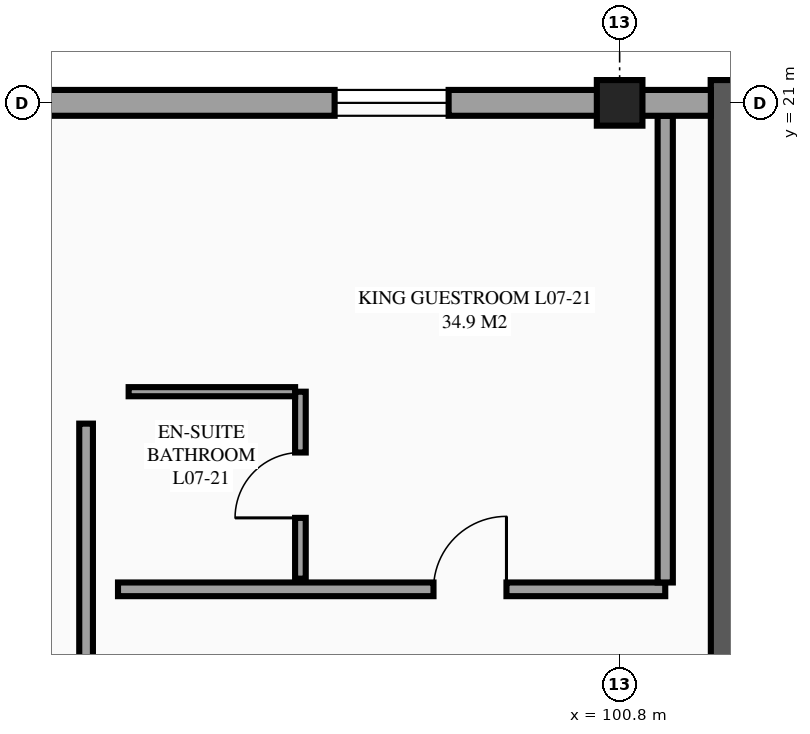
"""IFC4 building model, lengths in metres.
Left out: names, types, materials, properties, quantities, classifications, styles, units other than length and angle.
Written with IfcOpenShell. Run it as: python <this file> out.ifc"""

import sys

from ifc_helpers import new_model, si_unit, direction, frame, frame_2d, origin, origin_2d, place, context, subcontext, project, spatial, rectangle, extrude, element, fill, save


model = new_model("IFC4")
c1 = context("Model", 3, precision=1e-05, world=origin(), true_north=direction((0.0, 1.0)))
c2 = subcontext(c1, "Body", "Model", "MODEL_VIEW")
j1 = project(units=[si_unit("LENGTHUNIT", "METRE"), si_unit("PLANEANGLEUNIT", "RADIAN")], contexts=[c1])
p1 = place(None, origin())
s1 = spatial("IfcSite", under=j1, at=p1, CompositionType="ELEMENT")
p2 = place(p1, origin())
s2 = spatial("IfcBuilding", under=s1, at=p2, CompositionType="ELEMENT")
p3 = place(p2, frame((0.0, 0.0, 29.1)))
s3 = spatial("IfcBuildingStorey", under=s2, at=p3, CompositionType="ELEMENT", Elevation=29.1)
p4 = place(p3, frame((100.8, 21.0, 0.0), z_axis=(0.0, 0.0, 1.0), x_axis=(1.0, 0.0, 0.0)))
e1 = element("IfcColumn", 1, at=p4, inside=s3, PredefinedType="COLUMN", context=c2, shape_type="SweptSolid", body=[
    extrude(rectangle(XDim=0.6, YDim=0.6, at=origin_2d()), origin(), (0.0, 0.0, 1.0), 3.6),
])
p5 = place(p3, frame((100.8, 21.0, 0.0), z_axis=(0.0, 0.0, 1.0), x_axis=(-1.0, 0.0, 0.0)))
e2 = element("IfcWall", 2, at=p5, inside=s3, PredefinedType="STANDARD", context=c2, shape_type="SweptSolid", body=[
    extrude(rectangle(XDim=16.8, YDim=0.34, at=frame_2d((8.4, 0.0))), origin(), (0.0, 0.0, 1.0), 2.48),
])
p6 = place(p5, frame((2.25, 0.0, 0.85)))
e3 = element("IfcOpeningElement", 3, at=p6, cuts=e2, PredefinedType="OPENING", context=c2, shape_type="SweptSolid", body=[
    extrude(rectangle(XDim=1.5, YDim=1.5, at=frame_2d((0.75, 0.75))), frame((0.0, 0.18, 0.0), z_axis=(0.0, -1.0, 0.0), x_axis=(1.0, 0.0, 0.0)), (0.0, 0.0, 1.0), 0.36),
])
p7 = place(p3, frame((107.2, 21.15, 0.0), z_axis=(0.0, 0.0, 1.0), x_axis=(-1.0, 0.0, 0.0)))
e4 = element("IfcWall", 4, at=p7, inside=s3, PredefinedType="SHEAR", context=c2, shape_type="SweptSolid", body=[
    extrude(rectangle(XDim=5.2, YDim=0.3, at=frame_2d((2.6, 0.0))), origin(), (0.0, 0.0, 1.0), 3.6),
])
p8 = place(p3, frame((102.15, 21.3, 0.0), z_axis=(0.0, 0.0, 1.0), x_axis=(0.0, -1.0, 0.0)))
e5 = element("IfcWall", 5, at=p8, inside=s3, PredefinedType="SHEAR", context=c2, shape_type="SweptSolid", body=[
    extrude(rectangle(XDim=8.84, YDim=0.3, at=frame_2d((4.42, 0.0))), origin(), (0.0, 0.0, 1.0), 3.6),
])
p9 = place(p3, frame((94.2, 14.6, 0.0), z_axis=(0.0, 0.0, 1.0), x_axis=(1.0, 0.0, 0.0)))
e6 = element("IfcWall", 6, at=p9, inside=s3, PredefinedType="PARTITIONING", context=c2, shape_type="SweptSolid", body=[
    extrude(rectangle(XDim=7.2, YDim=0.18, at=frame_2d((3.6, 0.0))), origin(), (0.0, 0.0, 1.0), 3.375),
])
p10 = place(p9, frame((4.151, 0.0, 0.0)))
e7 = element("IfcOpeningElement", 7, at=p10, cuts=e6, PredefinedType="OPENING", context=c2, shape_type="SweptSolid", body=[
    extrude(rectangle(XDim=0.96, YDim=2.15, at=frame_2d((0.48, 1.075))), frame((0.0, 0.1, 0.0), z_axis=(0.0, -1.0, 0.0), x_axis=(1.0, 0.0, 0.0)), (0.0, 0.0, 1.0), 0.2),
])
p11 = place(p3, frame((101.4, 14.69, 0.0), z_axis=(0.0, 0.0, 1.0), x_axis=(0.0, 1.0, 0.0)))
e8 = element("IfcWall", 8, at=p11, inside=s3, PredefinedType="PARTITIONING", context=c2, shape_type="SweptSolid", body=[
    extrude(rectangle(XDim=6.14, YDim=0.2, at=frame_2d((3.07, 0.0))), origin(), (0.0, 0.0, 1.0), 3.375),
])
p12 = place(p3, frame((96.6, 14.74, 0.0), z_axis=(0.0, 0.0, 1.0), x_axis=(0.0, 1.0, 0.0)))
e9 = element("IfcWall", 9, at=p12, inside=s3, PredefinedType="PARTITIONING", context=c2, shape_type="SweptSolid", body=[
    extrude(rectangle(XDim=2.46, YDim=0.14, at=frame_2d((1.23, 0.0))), origin(), (0.0, 0.0, 1.0), 3.375),
])
p13 = place(p12, frame((0.8, 0.0, 0.0)))
e10 = element("IfcOpeningElement", 10, at=p13, cuts=e9, PredefinedType="OPENING", context=c2, shape_type="SweptSolid", body=[
    extrude(rectangle(XDim=0.86, YDim=2.1, at=frame_2d((0.43, 1.05))), frame((0.0, 0.08, 0.0), z_axis=(0.0, -1.0, 0.0), x_axis=(1.0, 0.0, 0.0)), (0.0, 0.0, 1.0), 0.16),
])
p14 = place(p3, frame((94.34, 17.2, 0.0), z_axis=(0.0, 0.0, 1.0), x_axis=(1.0, 0.0, 0.0)))
e11 = element("IfcWall", 11, at=p14, inside=s3, PredefinedType="PARTITIONING", context=c2, shape_type="SweptSolid", body=[
    extrude(rectangle(XDim=2.19, YDim=0.12, at=frame_2d((1.095, 0.0))), origin(), (0.0, 0.0, 1.0), 3.375),
])
p15 = place(p3, frame((93.78, 12.91, 0.0), z_axis=(0.0, 0.0, 1.0), x_axis=(0.0, 1.0, 0.0)))
e12 = element("IfcWall", 12, at=p15, inside=s3, PredefinedType="PARTITIONING", context=c2, shape_type="SweptSolid", body=[
    extrude(rectangle(XDim=3.87, YDim=0.18, at=frame_2d((1.935, 0.0))), origin(), (0.0, 0.0, 1.0), 3.375),
])
p16 = place(p3, frame((102.0, 21.0, 0.0), z_axis=(0.0, 0.0, 1.0), x_axis=(-1.0, 0.0, 0.0)))
e13 = element("IfcWall", 13, at=p16, inside=s3, PredefinedType="STANDARD", context=c2, shape_type="SweptSolid", body=[
    extrude(rectangle(XDim=1.2, YDim=0.34, at=frame_2d((0.6, 0.0))), origin(), (0.0, 0.0, 1.0), 3.126),
])
p17 = place(p6, origin())
e14 = element("IfcWindow", 14, at=p17, inside=s3, PartitioningType="SINGLE_PANEL", PredefinedType="WINDOW", context=c2, shape_type="SweptSolid", body=[
    extrude(rectangle(XDim=1.5, YDim=1.5, at=frame_2d((0.75, 0.75))), frame((0.0, 0.03, 0.0), z_axis=(0.0, -1.0, 0.0), x_axis=(1.0, 0.0, 0.0)), (0.0, 0.0, 1.0), 0.06),
])
fill(e3, e14)
p18 = place(p10, origin())
e15 = element("IfcDoor", 15, at=p18, inside=s3, OperationType="SINGLE_SWING_RIGHT", PredefinedType="DOOR", context=c2, shape_type="SweptSolid", body=[
    extrude(rectangle(XDim=0.96, YDim=2.15, at=frame_2d((0.48, 1.075))), frame((0.0, 0.025, 0.0), z_axis=(0.0, -1.0, 0.0), x_axis=(1.0, 0.0, 0.0)), (0.0, 0.0, 1.0), 0.05),
])
fill(e7, e15)
p19 = place(p13, origin())
e16 = element("IfcDoor", 16, at=p19, inside=s3, OperationType="SINGLE_SWING_LEFT", PredefinedType="DOOR", context=c2, shape_type="SweptSolid", body=[
    extrude(rectangle(XDim=0.86, YDim=2.1, at=frame_2d((0.43, 1.05))), frame((0.0, 0.025, 0.0), z_axis=(0.0, -1.0, 0.0), x_axis=(1.0, 0.0, 0.0)), (0.0, 0.0, 1.0), 0.05),
])
fill(e10, e16)
save(model, sys.argv[1])
